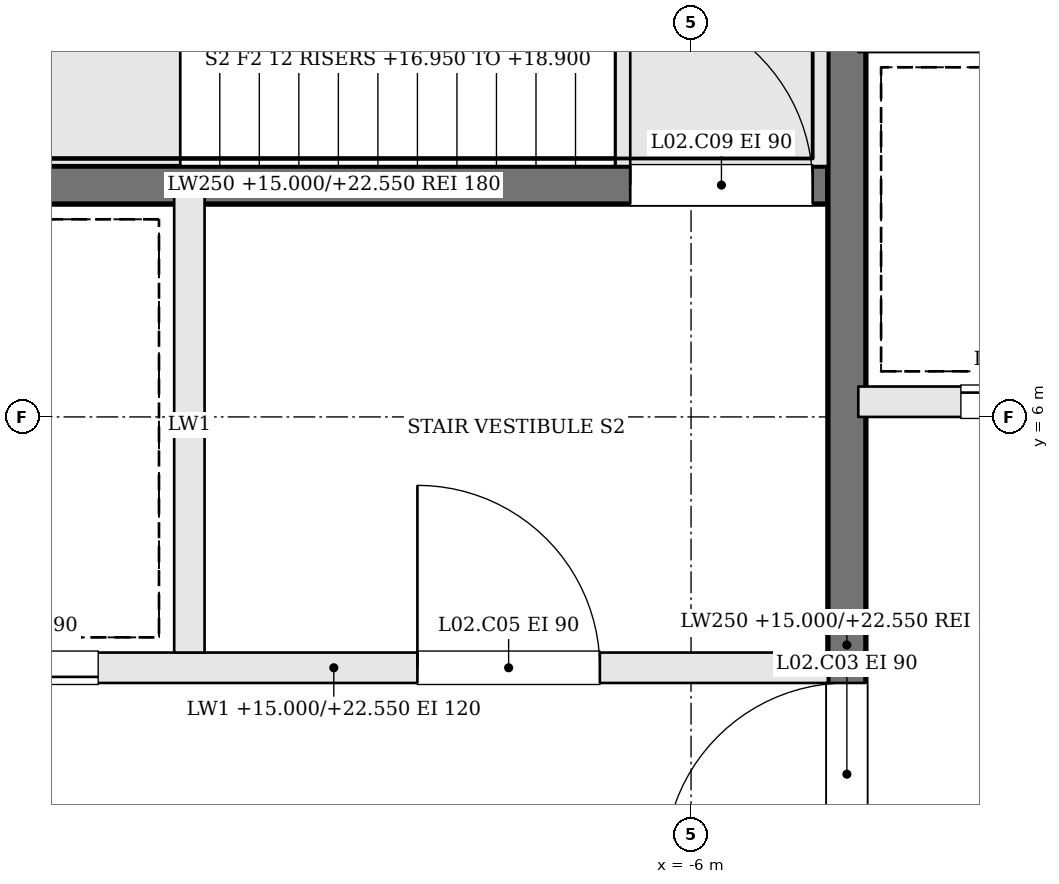
"""IFC4 building model, lengths in metres.
Left out: names, types, materials, properties, quantities, classifications, styles, units other than length and angle.
Written with IfcOpenShell. Run it as: python <this file> out.ifc"""

import sys

from ifc_helpers import new_model, si_unit, direction, frame, frame_2d, origin, place, context, subcontext, project, spatial, rectangle, extrude, element, fill, save


model = new_model("IFC4")
c1 = context("Model", 3, precision=1e-05, world=origin(), true_north=direction((0.0, 1.0)))
c2 = subcontext(c1, "Body", "Model", "MODEL_VIEW")
j1 = project(units=[si_unit("LENGTHUNIT", "METRE"), si_unit("PLANEANGLEUNIT", "RADIAN")], contexts=[c1])
p1 = place(None, origin())
s1 = spatial("IfcSite", under=j1, at=p1, CompositionType="ELEMENT")
p2 = place(p1, origin())
s2 = spatial("IfcBuilding", under=s1, at=p2, CompositionType="ELEMENT")
p3 = place(p2, frame((0.0, 0.0, 15.0)))
s3 = spatial("IfcBuildingStorey", under=s2, at=p3, CompositionType="ELEMENT", Elevation=15.0)
p4 = place(p3, frame((-11.6, 4.35, 0.0), z_axis=(0.0, 0.0, 1.0), x_axis=(1.0, 0.0, 0.0)))
e1 = element("IfcWall", 1, at=p4, inside=s3, PredefinedType="SOLIDWALL", context=c2, shape_type="SweptSolid", body=[
    extrude(rectangle(XDim=6.5, YDim=0.2, at=frame_2d((3.25, 0.0))), origin(), (0.0, 0.0, 1.0), 7.55),
])
p5 = place(p4, frame((3.8, 0.0, 0.0)))
e2 = element("IfcOpeningElement", 2, at=p5, cuts=e1, PredefinedType="OPENING", context=c2, shape_type="SweptSolid", body=[
    extrude(rectangle(XDim=1.2, YDim=2.1, at=frame_2d((0.6, 1.05))), frame((0.0, 0.11, 0.0), z_axis=(0.0, -1.0, 0.0), x_axis=(1.0, 0.0, 0.0)), (0.0, 0.0, 1.0), 0.22),
])
p6 = place(p4, frame((0.5, 0.0, 0.0)))
e3 = element("IfcOpeningElement", 3, at=p6, cuts=e1, PredefinedType="OPENING", context=c2, shape_type="SweptSolid", body=[
    extrude(rectangle(XDim=1.2, YDim=2.1, at=frame_2d((0.6, 1.05))), frame((0.0, 0.11, 0.0), z_axis=(0.0, -1.0, 0.0), x_axis=(1.0, 0.0, 0.0)), (0.0, 0.0, 1.0), 0.22),
])
p7 = place(p3, frame((-11.6, 7.525, 0.0), z_axis=(0.0, 0.0, 1.0), x_axis=(1.0, 0.0, 0.0)))
e4 = element("IfcWall", 4, at=p7, inside=s3, PredefinedType="SOLIDWALL", context=c2, shape_type="SweptSolid", body=[
    extrude(rectangle(XDim=6.5, YDim=0.25, at=frame_2d((3.25, 0.0))), origin(), (0.0, 0.0, 1.0), 7.55),
])
p8 = place(p7, frame((5.2, 0.0, 0.0)))
e5 = element("IfcOpeningElement", 5, at=p8, cuts=e4, PredefinedType="OPENING", context=c2, shape_type="SweptSolid", body=[
    extrude(rectangle(XDim=1.2, YDim=2.1, at=frame_2d((0.6, 1.05))), frame((0.0, 0.135, 0.0), z_axis=(0.0, -1.0, 0.0), x_axis=(1.0, 0.0, 0.0)), (0.0, 0.0, 1.0), 0.27),
])
p9 = place(p3, frame((-9.3, 4.45, 0.0), z_axis=(0.0, 0.0, 1.0), x_axis=(0.0, 1.0, 0.0)))
e6 = element("IfcWall", 6, at=p9, inside=s3, PredefinedType="SOLIDWALL", context=c2, shape_type="SweptSolid", body=[
    extrude(rectangle(XDim=3.0, YDim=0.2, at=frame_2d((1.5, 0.0))), origin(), (0.0, 0.0, 1.0), 7.55),
])
p10 = place(p3, frame((-4.975, -1.6, 0.0), z_axis=(0.0, 0.0, 1.0), x_axis=(0.0, 1.0, 0.0)))
e7 = element("IfcWall", 7, at=p10, inside=s3, PredefinedType="SOLIDWALL", context=c2, shape_type="SweptSolid", body=[
    extrude(rectangle(XDim=12.2, YDim=0.25, at=frame_2d((6.1, 0.0))), origin(), (0.0, 0.0, 1.0), 7.55),
])
p11 = place(p10, frame((4.65, 0.0, 0.0)))
e8 = element("IfcOpeningElement", 8, at=p11, cuts=e7, PredefinedType="OPENING", context=c2, shape_type="SweptSolid", body=[
    extrude(rectangle(XDim=1.2, YDim=2.1, at=frame_2d((0.6, 1.05))), frame((0.0, 0.135, 0.0), z_axis=(0.0, -1.0, 0.0), x_axis=(1.0, 0.0, 0.0)), (0.0, 0.0, 1.0), 0.27),
])
p12 = place(p3, frame((-4.9, 6.1, 0.0), z_axis=(0.0, 0.0, 1.0), x_axis=(1.0, 0.0, 0.0)))
e9 = element("IfcWall", 9, at=p12, inside=s3, PredefinedType="SOLIDWALL", context=c2, shape_type="SweptSolid", body=[
    extrude(rectangle(XDim=9.8, YDim=0.2, at=frame_2d((4.9, 0.0))), origin(), (0.0, 0.0, 1.0), 7.55),
])
p13 = place(p12, frame((0.675, 0.0, 0.0)))
e10 = element("IfcOpeningElement", 10, at=p13, cuts=e9, PredefinedType="OPENING", context=c2, shape_type="SweptSolid", body=[
    extrude(rectangle(XDim=1.1, YDim=2.1, at=frame_2d((0.55, 1.05))), frame((0.0, 0.11, 0.0), z_axis=(0.0, -1.0, 0.0), x_axis=(1.0, 0.0, 0.0)), (0.0, 0.0, 1.0), 0.22),
])
p14 = place(p12, frame((3.125, 0.0, 0.0)))
e11 = element("IfcOpeningElement", 11, at=p14, cuts=e9, PredefinedType="OPENING", context=c2, shape_type="SweptSolid", body=[
    extrude(rectangle(XDim=1.1, YDim=2.1, at=frame_2d((0.55, 1.05))), frame((0.0, 0.11, 0.0), z_axis=(0.0, -1.0, 0.0), x_axis=(1.0, 0.0, 0.0)), (0.0, 0.0, 1.0), 0.22),
])
p15 = place(p12, frame((5.575, 0.0, 0.0)))
e12 = element("IfcOpeningElement", 12, at=p15, cuts=e9, PredefinedType="OPENING", context=c2, shape_type="SweptSolid", body=[
    extrude(rectangle(XDim=1.1, YDim=2.1, at=frame_2d((0.55, 1.05))), frame((0.0, 0.11, 0.0), z_axis=(0.0, -1.0, 0.0), x_axis=(1.0, 0.0, 0.0)), (0.0, 0.0, 1.0), 0.22),
])
p16 = place(p12, frame((8.025, 0.0, 0.0)))
e13 = element("IfcOpeningElement", 13, at=p16, cuts=e9, PredefinedType="OPENING", context=c2, shape_type="SweptSolid", body=[
    extrude(rectangle(XDim=1.1, YDim=2.1, at=frame_2d((0.55, 1.05))), frame((0.0, 0.11, 0.0), z_axis=(0.0, -1.0, 0.0), x_axis=(1.0, 0.0, 0.0)), (0.0, 0.0, 1.0), 0.22),
])
p17 = place(p11, origin())
e14 = element("IfcDoor", 14, at=p17, inside=s3, OperationType="SINGLE_SWING_LEFT", PredefinedType="DOOR", context=c2, shape_type="SweptSolid", body=[
    extrude(rectangle(XDim=1.2, YDim=2.1, at=frame_2d((0.6, 1.05))), frame((0.0, 0.025, 0.0), z_axis=(0.0, -1.0, 0.0), x_axis=(1.0, 0.0, 0.0)), (0.0, 0.0, 1.0), 0.05),
])
fill(e8, e14)
p18 = place(p5, origin())
e15 = element("IfcDoor", 15, at=p18, inside=s3, OperationType="SINGLE_SWING_LEFT", PredefinedType="DOOR", context=c2, shape_type="SweptSolid", body=[
    extrude(rectangle(XDim=1.2, YDim=2.1, at=frame_2d((0.6, 1.05))), frame((0.0, 0.025, 0.0), z_axis=(0.0, -1.0, 0.0), x_axis=(1.0, 0.0, 0.0)), (0.0, 0.0, 1.0), 0.05),
])
fill(e2, e15)
p19 = place(p8, origin())
e16 = element("IfcDoor", 16, at=p19, inside=s3, OperationType="SINGLE_SWING_LEFT", PredefinedType="DOOR", context=c2, shape_type="SweptSolid", body=[
    extrude(rectangle(XDim=1.2, YDim=2.1, at=frame_2d((0.6, 1.05))), frame((0.0, 0.025, 0.0), z_axis=(0.0, -1.0, 0.0), x_axis=(1.0, 0.0, 0.0)), (0.0, 0.0, 1.0), 0.05),
])
fill(e5, e16)
p20 = place(p6, origin())
e17 = element("IfcDoor", 17, at=p20, inside=s3, OperationType="SLIDING_TO_RIGHT", PredefinedType="DOOR", context=c2, shape_type="SweptSolid", body=[
    extrude(rectangle(XDim=1.2, YDim=2.1, at=frame_2d((0.6, 1.05))), frame((0.0, 0.025, 0.0), z_axis=(0.0, -1.0, 0.0), x_axis=(1.0, 0.0, 0.0)), (0.0, 0.0, 1.0), 0.05),
])
fill(e3, e17)
p21 = place(p13, origin())
e18 = element("IfcDoor", 18, at=p21, inside=s3, OperationType="SLIDING_TO_RIGHT", PredefinedType="DOOR", context=c2, shape_type="SweptSolid", body=[
    extrude(rectangle(XDim=1.1, YDim=2.1, at=frame_2d((0.55, 1.05))), frame((0.0, 0.025, 0.0), z_axis=(0.0, -1.0, 0.0), x_axis=(1.0, 0.0, 0.0)), (0.0, 0.0, 1.0), 0.05),
])
fill(e10, e18)
save(model, sys.argv[1])
